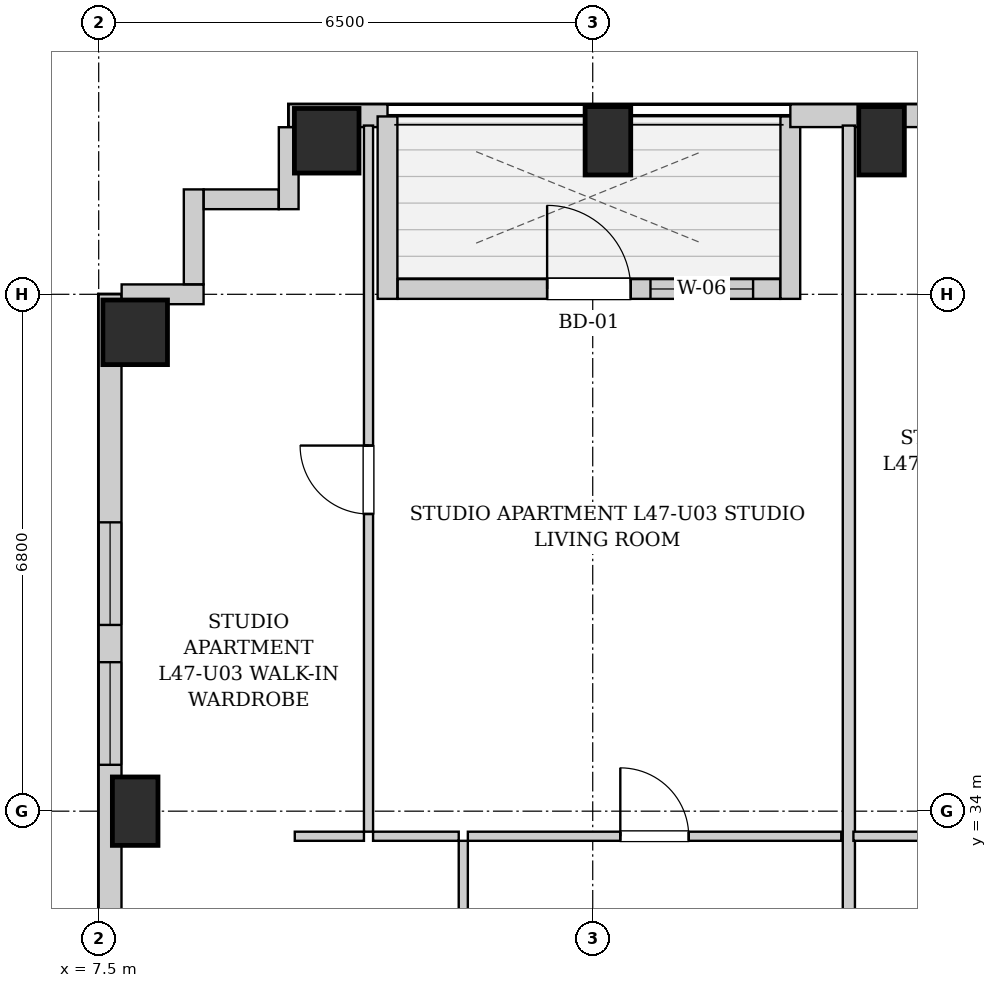
"""IFC4 building model, lengths in metres.
Left out: names, types, materials, properties, quantities, classifications, styles, units other than length and angle.
Written with IfcOpenShell. Run it as: python <this file> out.ifc"""

import sys

from ifc_helpers import new_model, si_unit, direction, frame, frame_2d, origin, origin_2d, place, context, subcontext, project, spatial, rectangle, extrude, element, fill, save


model = new_model("IFC4")
c1 = context("Model", 3, precision=1e-05, world=origin(), true_north=direction((0.0, 1.0)))
c2 = subcontext(c1, "Body", "Model", "MODEL_VIEW")
j1 = project(units=[si_unit("LENGTHUNIT", "METRE"), si_unit("PLANEANGLEUNIT", "RADIAN")], contexts=[c1])
p1 = place(None, origin())
s1 = spatial("IfcSite", under=j1, at=p1, CompositionType="ELEMENT")
p2 = place(p1, origin())
s2 = spatial("IfcBuilding", under=s1, at=p2, CompositionType="ELEMENT")
p3 = place(p2, frame((0.0, 0.0, 163.4)))
s3 = spatial("IfcBuildingStorey", under=s2, at=p3, CompositionType="ELEMENT", Elevation=163.4)
p4 = place(p3, frame((10.5, 42.82, 0.0), z_axis=(0.0, 0.0, 1.0), x_axis=(1.0, 0.0, 0.0)))
e1 = element("IfcColumn", 1, at=p4, inside=s3, PredefinedType="COLUMN", context=c2, shape_type="SweptSolid", body=[
    extrude(rectangle(XDim=0.85, YDim=0.85, at=origin_2d()), origin(), (0.0, 0.0, 1.0), 3.25),
])
for number, where, z_axis, x_axis in (
    (2, (14.2, 42.82, 0.0), (0.0, 0.0, 1.0), (1.0, 0.0, 0.0)),
    (3, (17.8, 42.82, 0.0), (0.0, 0.0, 1.0), (1.0, 0.0, 0.0)),
    (4, (7.98, 34.0, 0.0), (0.0, 0.0, 1.0), (1.0, 0.0, 0.0)),
):
    element("IfcColumn", number, at=place(p3, frame(where, z_axis=z_axis, x_axis=x_axis)), inside=s3, PredefinedType="COLUMN", context=c2, shape_type="SweptSolid", body=[
        extrude(rectangle(XDim=0.6, YDim=0.9, at=origin_2d()), origin(), (0.0, 0.0, 1.0), 3.25),
    ])
p5 = place(p3, frame((7.98, 40.3, 0.0), z_axis=(0.0, 0.0, 1.0), x_axis=(1.0, 0.0, 0.0)))
e5 = element("IfcColumn", 5, at=p5, inside=s3, PredefinedType="COLUMN", context=c2, shape_type="SweptSolid", body=[
    extrude(rectangle(XDim=0.85, YDim=0.85, at=origin_2d()), origin(), (0.0, 0.0, 1.0), 3.25),
])
p6 = place(p3, frame((10.0, 43.15, 0.0), z_axis=(0.0, 0.0, 1.0), x_axis=(1.0, 0.0, 0.0)))
e6 = element("IfcWall", 6, at=p6, inside=s3, PredefinedType="SOLIDWALL", context=c2, shape_type="SweptSolid", body=[
    extrude(rectangle(XDim=1.3, YDim=0.3, at=frame_2d((0.65, 0.0))), origin(), (0.0, 0.0, 1.0), 2.99),
])
p7 = place(p3, frame((11.3, 43.14, 0.0), z_axis=(0.0, 0.0, 1.0), x_axis=(0.0, -1.0, 0.0)))
e7 = element("IfcWall", 7, at=p7, inside=s3, PredefinedType="SOLIDWALL", context=c2, shape_type="SweptSolid", body=[
    extrude(rectangle(XDim=2.4, YDim=0.26, at=frame_2d((1.2, 0.0))), origin(), (0.0, 0.0, 1.0), 2.99),
])
p8 = place(p3, frame((11.434, 40.87, 0.0), z_axis=(0.0, 0.0, 1.0), x_axis=(1.0, 0.0, 0.0)))
e8 = element("IfcWall", 8, at=p8, inside=s3, PredefinedType="SOLIDWALL", context=c2, shape_type="SweptSolid", body=[
    extrude(rectangle(XDim=5.032, YDim=0.26, at=frame_2d((2.516, 0.0))), origin(), (0.0, 0.0, 1.0), 2.99),
])
p9 = place(p8, frame((1.966, 0.0, 0.0)))
e9 = element("IfcOpeningElement", 9, at=p9, cuts=e8, PredefinedType="OPENING", context=c2, shape_type="SweptSolid", body=[
    extrude(rectangle(XDim=1.1, YDim=2.0, at=frame_2d((0.55, 1.0))), frame((0.0, 0.14, 0.0), z_axis=(0.0, -1.0, 0.0), x_axis=(1.0, 0.0, 0.0)), (0.0, 0.0, 1.0), 0.28),
])
p10 = place(p8, frame((3.326, 0.0, 0.85)))
e10 = element("IfcOpeningElement", 10, at=p10, cuts=e8, PredefinedType="OPENING", context=c2, shape_type="SweptSolid", body=[
    extrude(rectangle(XDim=1.35, YDim=1.65, at=frame_2d((0.675, 0.825))), frame((0.0, 0.14, 0.0), z_axis=(0.0, -1.0, 0.0), x_axis=(1.0, 0.0, 0.0)), (0.0, 0.0, 1.0), 0.28),
])
p11 = place(p3, frame((16.6, 40.74, 0.0), z_axis=(0.0, 0.0, 1.0), x_axis=(0.0, 1.0, 0.0)))
e11 = element("IfcWall", 11, at=p11, inside=s3, PredefinedType="SOLIDWALL", context=c2, shape_type="SweptSolid", body=[
    extrude(rectangle(XDim=2.4, YDim=0.26, at=frame_2d((1.2, 0.0))), origin(), (0.0, 0.0, 1.0), 2.99),
])
p12 = place(p3, frame((16.6, 43.15, 0.0), z_axis=(0.0, 0.0, 1.0), x_axis=(1.0, 0.0, 0.0)))
e12 = element("IfcWall", 12, at=p12, inside=s3, PredefinedType="SOLIDWALL", context=c2, shape_type="SweptSolid", body=[
    extrude(rectangle(XDim=13.55, YDim=0.3, at=frame_2d((6.775, 0.0))), origin(), (0.0, 0.0, 1.0), 2.99),
])
p13 = place(p12, frame((2.186, 0.0, 0.55)))
e13 = element("IfcOpeningElement", 13, at=p13, cuts=e12, PredefinedType="OPENING", context=c2, shape_type="SweptSolid", body=[
    extrude(rectangle(XDim=1.35, YDim=1.2, at=frame_2d((0.675, 0.6))), frame((0.0, 0.16, 0.0), z_axis=(0.0, -1.0, 0.0), x_axis=(1.0, 0.0, 0.0)), (0.0, 0.0, 1.0), 0.32),
])
p14 = place(p12, frame((10.9, 0.0, 0.55)))
e14 = element("IfcOpeningElement", 14, at=p14, cuts=e12, PredefinedType="OPENING", context=c2, shape_type="SweptSolid", body=[
    extrude(rectangle(XDim=1.35, YDim=1.2, at=frame_2d((0.675, 0.6))), frame((0.0, 0.16, 0.0), z_axis=(0.0, -1.0, 0.0), x_axis=(1.0, 0.0, 0.0)), (0.0, 0.0, 1.0), 0.32),
])
p15 = place(p3, frame((7.65, 6.3, 0.0), z_axis=(0.0, 0.0, 1.0), x_axis=(0.0, 1.0, 0.0)))
e15 = element("IfcWall", 15, at=p15, inside=s3, PredefinedType="SOLIDWALL", context=c2, shape_type="SweptSolid", body=[
    extrude(rectangle(XDim=34.5, YDim=0.3, at=frame_2d((17.25, 0.0))), origin(), (0.0, 0.0, 1.0), 2.99),
])
p16 = place(p15, frame((1.425, 0.0, 0.55)))
e16 = element("IfcOpeningElement", 16, at=p16, cuts=e15, PredefinedType="OPENING", context=c2, shape_type="SweptSolid", body=[
    extrude(rectangle(XDim=1.35, YDim=1.2, at=frame_2d((0.675, 0.6))), frame((0.0, 0.16, 0.0), z_axis=(0.0, -1.0, 0.0), x_axis=(1.0, 0.0, 0.0)), (0.0, 0.0, 1.0), 0.32),
])
p17 = place(p15, frame((30.15, 0.0, 0.55)))
e17 = element("IfcOpeningElement", 17, at=p17, cuts=e15, PredefinedType="OPENING", context=c2, shape_type="SweptSolid", body=[
    extrude(rectangle(XDim=1.35, YDim=1.2, at=frame_2d((0.675, 0.6))), frame((0.0, 0.16, 0.0), z_axis=(0.0, -1.0, 0.0), x_axis=(1.0, 0.0, 0.0)), (0.0, 0.0, 1.0), 0.32),
])
p18 = place(p15, frame((28.31, 0.0, 0.55)))
e18 = element("IfcOpeningElement", 18, at=p18, cuts=e15, PredefinedType="OPENING", context=c2, shape_type="SweptSolid", body=[
    extrude(rectangle(XDim=1.35, YDim=1.2, at=frame_2d((0.675, 0.6))), frame((0.0, 0.16, 0.0), z_axis=(0.0, -1.0, 0.0), x_axis=(1.0, 0.0, 0.0)), (0.0, 0.0, 1.0), 0.32),
])
p19 = place(p15, frame((11.85, 0.0, 0.55)))
e19 = element("IfcOpeningElement", 19, at=p19, cuts=e15, PredefinedType="OPENING", context=c2, shape_type="SweptSolid", body=[
    extrude(rectangle(XDim=1.35, YDim=1.2, at=frame_2d((0.675, 0.6))), frame((0.0, 0.16, 0.0), z_axis=(0.0, -1.0, 0.0), x_axis=(1.0, 0.0, 0.0)), (0.0, 0.0, 1.0), 0.32),
])
p20 = place(p15, frame((9.31, 0.0, 0.55)))
e20 = element("IfcOpeningElement", 20, at=p20, cuts=e15, PredefinedType="OPENING", context=c2, shape_type="SweptSolid", body=[
    extrude(rectangle(XDim=1.35, YDim=1.2, at=frame_2d((0.675, 0.6))), frame((0.0, 0.16, 0.0), z_axis=(0.0, -1.0, 0.0), x_axis=(1.0, 0.0, 0.0)), (0.0, 0.0, 1.0), 0.32),
])
p21 = place(p15, frame((18.975, 0.0, 0.55)))
e21 = element("IfcOpeningElement", 21, at=p21, cuts=e15, PredefinedType="OPENING", context=c2, shape_type="SweptSolid", body=[
    extrude(rectangle(XDim=1.35, YDim=1.2, at=frame_2d((0.675, 0.6))), frame((0.0, 0.16, 0.0), z_axis=(0.0, -1.0, 0.0), x_axis=(1.0, 0.0, 0.0)), (0.0, 0.0, 1.0), 0.32),
])
p22 = place(p15, frame((20.585, 0.0, 0.55)))
e22 = element("IfcOpeningElement", 22, at=p22, cuts=e15, PredefinedType="OPENING", context=c2, shape_type="SweptSolid", body=[
    extrude(rectangle(XDim=1.35, YDim=1.2, at=frame_2d((0.675, 0.6))), frame((0.0, 0.16, 0.0), z_axis=(0.0, -1.0, 0.0), x_axis=(1.0, 0.0, 0.0)), (0.0, 0.0, 1.0), 0.32),
])
p23 = place(p3, frame((7.802, 40.8, 0.0), z_axis=(0.0, 0.0, 1.0), x_axis=(1.0, 0.0, 0.0)))
e23 = element("IfcWall", 23, at=p23, inside=s3, PredefinedType="SOLIDWALL", context=c2, shape_type="SweptSolid", body=[
    extrude(rectangle(XDim=1.078, YDim=0.26, at=frame_2d((0.539, 0.0))), origin(), (0.0, 0.0, 1.0), 2.99),
])
p24 = place(p3, frame((8.75, 40.932, 0.0), z_axis=(0.0, 0.0, 1.0), x_axis=(0.0, 1.0, 0.0)))
e24 = element("IfcWall", 24, at=p24, inside=s3, PredefinedType="SOLIDWALL", context=c2, shape_type="SweptSolid", body=[
    extrude(rectangle(XDim=1.248, YDim=0.26, at=frame_2d((0.624, 0.0))), origin(), (0.0, 0.0, 1.0), 2.99),
])
p25 = place(p3, frame((8.882, 42.05, 0.0), z_axis=(0.0, 0.0, 1.0), x_axis=(1.0, 0.0, 0.0)))
e25 = element("IfcWall", 25, at=p25, inside=s3, PredefinedType="SOLIDWALL", context=c2, shape_type="SweptSolid", body=[
    extrude(rectangle(XDim=0.986, YDim=0.26, at=frame_2d((0.493, 0.0))), origin(), (0.0, 0.0, 1.0), 2.99),
])
p26 = place(p3, frame((10.0, 41.92, 0.0), z_axis=(0.0, 0.0, 1.0), x_axis=(0.0, 1.0, 0.0)))
e26 = element("IfcWall", 26, at=p26, inside=s3, PredefinedType="SOLIDWALL", context=c2, shape_type="SweptSolid", body=[
    extrude(rectangle(XDim=1.078, YDim=0.26, at=frame_2d((0.539, 0.0))), origin(), (0.0, 0.0, 1.0), 2.99),
])
p27 = place(p3, frame((12.297, 30.76, 0.0), z_axis=(0.0, 0.0, 1.0), x_axis=(0.0, 1.0, 0.0)))
e27 = element("IfcWall", 27, at=p27, inside=s3, PredefinedType="PARTITIONING", context=c2, shape_type="SweptSolid", body=[
    extrude(rectangle(XDim=2.85, YDim=0.12, at=frame_2d((1.425, 0.0))), origin(), (0.0, 0.0, 1.0), 2.99),
])
p28 = place(p27, frame((0.995, 0.0, 0.0)))
e28 = element("IfcOpeningElement", 28, at=p28, cuts=e27, PredefinedType="OPENING", context=c2, shape_type="SweptSolid", body=[
    extrude(rectangle(XDim=0.86, YDim=2.05, at=frame_2d((0.43, 1.025))), frame((0.0, 0.07, 0.0), z_axis=(0.0, -1.0, 0.0), x_axis=(1.0, 0.0, 0.0)), (0.0, 0.0, 1.0), 0.14),
])
p29 = place(p3, frame((10.08, 33.67, 0.0), z_axis=(0.0, 0.0, 1.0), x_axis=(1.0, 0.0, 0.0)))
e29 = element("IfcWall", 29, at=p29, inside=s3, PredefinedType="PARTITIONING", context=c2, shape_type="SweptSolid", body=[
    extrude(rectangle(XDim=0.91, YDim=0.12, at=frame_2d((0.455, 0.0))), origin(), (0.0, 0.0, 1.0), 2.99),
])
p30 = place(p3, frame((11.11, 33.67, 0.0), z_axis=(0.0, 0.0, 1.0), x_axis=(1.0, 0.0, 0.0)))
e30 = element("IfcWall", 30, at=p30, inside=s3, PredefinedType="PARTITIONING", context=c2, shape_type="SweptSolid", body=[
    extrude(rectangle(XDim=1.127, YDim=0.12, at=frame_2d((0.563, 0.0))), origin(), (0.0, 0.0, 1.0), 2.99),
])
p31 = place(p3, frame((12.357, 33.67, 0.0), z_axis=(0.0, 0.0, 1.0), x_axis=(1.0, 0.0, 0.0)))
e31 = element("IfcWall", 31, at=p31, inside=s3, PredefinedType="PARTITIONING", context=c2, shape_type="SweptSolid", body=[
    extrude(rectangle(XDim=4.913, YDim=0.12, at=frame_2d((2.457, 0.0))), origin(), (0.0, 0.0, 1.0), 2.99),
])
p32 = place(p31, frame((2.006, 0.0, 0.0)))
e32 = element("IfcOpeningElement", 32, at=p32, cuts=e31, PredefinedType="OPENING", context=c2, shape_type="SweptSolid", body=[
    extrude(rectangle(XDim=0.9, YDim=2.05, at=frame_2d((0.45, 1.025))), frame((0.0, 0.07, 0.0), z_axis=(0.0, -1.0, 0.0), x_axis=(1.0, 0.0, 0.0)), (0.0, 0.0, 1.0), 0.14),
])
p33 = place(p3, frame((11.05, 33.73, 0.0), z_axis=(0.0, 0.0, 1.0), x_axis=(0.0, 1.0, 0.0)))
e33 = element("IfcWall", 33, at=p33, inside=s3, PredefinedType="PARTITIONING", context=c2, shape_type="SweptSolid", body=[
    extrude(rectangle(XDim=9.29, YDim=0.12, at=frame_2d((4.645, 0.0))), origin(), (0.0, 0.0, 1.0), 2.99),
])
p34 = place(p33, frame((4.18, 0.0, 0.0)))
e34 = element("IfcOpeningElement", 34, at=p34, cuts=e33, PredefinedType="OPENING", context=c2, shape_type="SweptSolid", body=[
    extrude(rectangle(XDim=0.9, YDim=2.05, at=frame_2d((0.45, 1.025))), frame((0.0, 0.07, 0.0), z_axis=(0.0, -1.0, 0.0), x_axis=(1.0, 0.0, 0.0)), (0.0, 0.0, 1.0), 0.14),
])
p35 = place(p3, frame((17.37, 30.76, 0.0), z_axis=(0.0, 0.0, 1.0), x_axis=(0.0, 1.0, 0.0)))
e35 = element("IfcWall", 35, at=p35, inside=s3, PredefinedType="PARTITIONING", context=c2, shape_type="SweptSolid", body=[
    extrude(rectangle(XDim=12.26, YDim=0.16, at=frame_2d((6.13, 0.0))), origin(), (0.0, 0.0, 1.0), 2.99),
])
p36 = place(p3, frame((17.43, 33.67, 0.0), z_axis=(0.0, 0.0, 1.0), x_axis=(1.0, 0.0, 0.0)))
e36 = element("IfcWall", 36, at=p36, inside=s3, PredefinedType="PARTITIONING", context=c2, shape_type="SweptSolid", body=[
    extrude(rectangle(XDim=1.85, YDim=0.12, at=frame_2d((0.925, 0.0))), origin(), (0.0, 0.0, 1.0), 2.99),
])
p37 = place(p32, origin())
e37 = element("IfcDoor", 37, at=p37, inside=s3, OperationType="SINGLE_SWING_LEFT", PredefinedType="DOOR", context=c2, shape_type="SweptSolid", body=[
    extrude(rectangle(XDim=0.9, YDim=2.05, at=frame_2d((0.45, 1.025))), frame((0.0, 0.025, 0.0), z_axis=(0.0, -1.0, 0.0), x_axis=(1.0, 0.0, 0.0)), (0.0, 0.0, 1.0), 0.05),
])
fill(e32, e37)
p38 = place(p34, origin())
e38 = element("IfcDoor", 38, at=p38, inside=s3, OperationType="SINGLE_SWING_RIGHT", PredefinedType="DOOR", context=c2, shape_type="SweptSolid", body=[
    extrude(rectangle(XDim=0.9, YDim=2.05, at=frame_2d((0.45, 1.025))), frame((0.0, 0.025, 0.0), z_axis=(0.0, -1.0, 0.0), x_axis=(1.0, 0.0, 0.0)), (0.0, 0.0, 1.0), 0.05),
])
fill(e34, e38)
p39 = place(p9, origin())
e39 = element("IfcDoor", 39, at=p39, inside=s3, OperationType="SINGLE_SWING_LEFT", PredefinedType="DOOR", context=c2, shape_type="SweptSolid", body=[
    extrude(rectangle(XDim=1.1, YDim=2.0, at=frame_2d((0.55, 1.0))), frame((0.0, 0.025, 0.0), z_axis=(0.0, -1.0, 0.0), x_axis=(1.0, 0.0, 0.0)), (0.0, 0.0, 1.0), 0.05),
])
fill(e9, e39)
p40 = place(p17, origin())
e40 = element("IfcWindow", 40, at=p40, inside=s3, PartitioningType="SINGLE_PANEL", PredefinedType="WINDOW", context=c2, shape_type="SweptSolid", body=[
    extrude(rectangle(XDim=1.35, YDim=1.2, at=frame_2d((0.675, 0.6))), frame((0.0, 0.03, 0.0), z_axis=(0.0, -1.0, 0.0), x_axis=(1.0, 0.0, 0.0)), (0.0, 0.0, 1.0), 0.06),
])
fill(e17, e40)
p41 = place(p18, origin())
e41 = element("IfcWindow", 41, at=p41, inside=s3, PartitioningType="SINGLE_PANEL", PredefinedType="WINDOW", context=c2, shape_type="SweptSolid", body=[
    extrude(rectangle(XDim=1.35, YDim=1.2, at=frame_2d((0.675, 0.6))), frame((0.0, 0.03, 0.0), z_axis=(0.0, -1.0, 0.0), x_axis=(1.0, 0.0, 0.0)), (0.0, 0.0, 1.0), 0.06),
])
fill(e18, e41)
p42 = place(p10, origin())
e42 = element("IfcWindow", 42, at=p42, inside=s3, PartitioningType="SINGLE_PANEL", PredefinedType="WINDOW", context=c2, shape_type="SweptSolid", body=[
    extrude(rectangle(XDim=1.35, YDim=1.65, at=frame_2d((0.675, 0.825))), frame((0.0, 0.03, 0.0), z_axis=(0.0, -1.0, 0.0), x_axis=(1.0, 0.0, 0.0)), (0.0, 0.0, 1.0), 0.06),
])
fill(e10, e42)
save(model, sys.argv[1])
